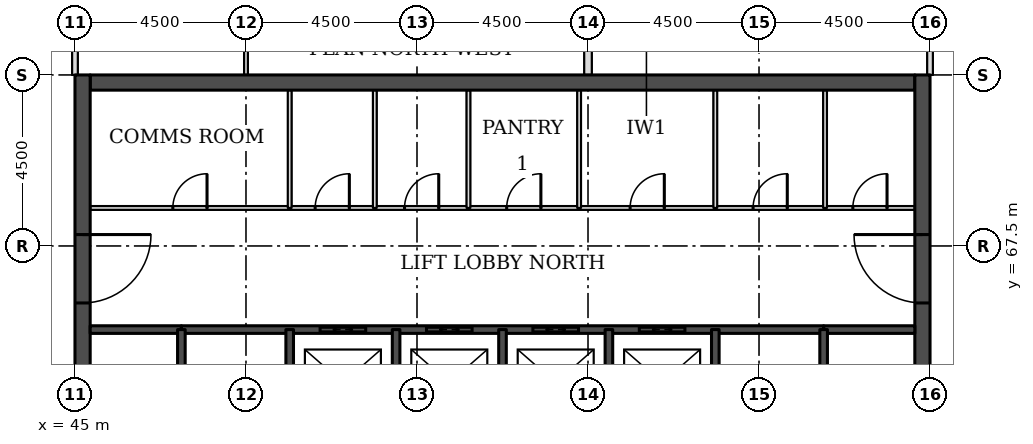
"""IFC4 building model, lengths in metres.
Left out: names, types, materials, properties, quantities, classifications, styles, units other than length and angle.
Written with IfcOpenShell. Run it as: python <this file> out.ifc"""

import sys

from ifc_helpers import new_model, si_unit, direction, frame, frame_2d, origin, place, context, subcontext, project, spatial, rectangle, extrude, element, fill, save


model = new_model("IFC4")
c1 = context("Model", 3, precision=1e-05, world=origin(), true_north=direction((0.0, 1.0)))
c2 = subcontext(c1, "Body", "Model", "MODEL_VIEW")
j1 = project(units=[si_unit("LENGTHUNIT", "METRE"), si_unit("PLANEANGLEUNIT", "RADIAN")], contexts=[c1])
p1 = place(None, origin())
s1 = spatial("IfcSite", under=j1, at=p1, CompositionType="ELEMENT")
p2 = place(p1, origin())
s2 = spatial("IfcBuilding", under=s1, at=p2, CompositionType="ELEMENT")
p3 = place(p2, frame((0.0, 0.0, 158.8)))
s3 = spatial("IfcBuildingStorey", under=s2, at=p3, CompositionType="ELEMENT", Elevation=158.8)
p4 = place(p3, frame((45.4, 71.8, 0.0), z_axis=(0.0, 0.0, 1.0), x_axis=(1.0, 0.0, 0.0)))
e1 = element("IfcWall", 1, at=p4, inside=s3, PredefinedType="SHEAR", context=c2, shape_type="SweptSolid", body=[
    extrude(rectangle(XDim=21.7, YDim=0.4, at=frame_2d((10.85, 0.0))), origin(), (0.0, 0.0, 1.0), 3.7),
])
p5 = place(p3, frame((45.2, 49.5, 0.0), z_axis=(0.0, 0.0, 1.0), x_axis=(0.0, 1.0, 0.0)))
e2 = element("IfcWall", 2, at=p5, inside=s3, PredefinedType="SHEAR", context=c2, shape_type="SweptSolid", body=[
    extrude(rectangle(XDim=22.5, YDim=0.4, at=frame_2d((11.25, 0.0))), origin(), (0.0, 0.0, 1.0), 3.7),
])
p6 = place(p5, frame((4.2, 0.0, 0.0)))
e3 = element("IfcOpeningElement", 3, at=p6, cuts=e2, PredefinedType="OPENING", context=c2, shape_type="SweptSolid", body=[
    extrude(rectangle(XDim=1.8, YDim=2.1, at=frame_2d((0.9, 1.05))), frame((0.0, 0.21, 0.0), z_axis=(0.0, -1.0, 0.0), x_axis=(1.0, 0.0, 0.0)), (0.0, 0.0, 1.0), 0.42),
])
p7 = place(p5, frame((6.9, 0.0, 0.0)))
e4 = element("IfcOpeningElement", 4, at=p7, cuts=e2, PredefinedType="OPENING", context=c2, shape_type="SweptSolid", body=[
    extrude(rectangle(XDim=1.1, YDim=2.1, at=frame_2d((0.55, 1.05))), frame((0.0, 0.21, 0.0), z_axis=(0.0, -1.0, 0.0), x_axis=(1.0, 0.0, 0.0)), (0.0, 0.0, 1.0), 0.42),
])
p8 = place(p5, frame((13.6, 0.0, 0.0)))
e5 = element("IfcOpeningElement", 5, at=p8, cuts=e2, PredefinedType="OPENING", context=c2, shape_type="SweptSolid", body=[
    extrude(rectangle(XDim=1.1, YDim=2.1, at=frame_2d((0.55, 1.05))), frame((0.0, 0.21, 0.0), z_axis=(0.0, -1.0, 0.0), x_axis=(1.0, 0.0, 0.0)), (0.0, 0.0, 1.0), 0.42),
])
p9 = place(p5, frame((16.5, 0.0, 0.0)))
e6 = element("IfcOpeningElement", 6, at=p9, cuts=e2, PredefinedType="OPENING", context=c2, shape_type="SweptSolid", body=[
    extrude(rectangle(XDim=1.8, YDim=2.1, at=frame_2d((0.9, 1.05))), frame((0.0, 0.21, 0.0), z_axis=(0.0, -1.0, 0.0), x_axis=(1.0, 0.0, 0.0)), (0.0, 0.0, 1.0), 0.42),
])
p10 = place(p3, frame((67.3, 49.5, 0.0), z_axis=(0.0, 0.0, 1.0), x_axis=(0.0, 1.0, 0.0)))
e7 = element("IfcWall", 7, at=p10, inside=s3, PredefinedType="SHEAR", context=c2, shape_type="SweptSolid", body=[
    extrude(rectangle(XDim=22.5, YDim=0.4, at=frame_2d((11.25, 0.0))), origin(), (0.0, 0.0, 1.0), 3.7),
])
p11 = place(p10, frame((4.2, 0.0, 0.0)))
e8 = element("IfcOpeningElement", 8, at=p11, cuts=e7, PredefinedType="OPENING", context=c2, shape_type="SweptSolid", body=[
    extrude(rectangle(XDim=1.8, YDim=2.1, at=frame_2d((0.9, 1.05))), frame((0.0, 0.21, 0.0), z_axis=(0.0, -1.0, 0.0), x_axis=(1.0, 0.0, 0.0)), (0.0, 0.0, 1.0), 0.42),
])
p12 = place(p10, frame((6.9, 0.0, 0.0)))
e9 = element("IfcOpeningElement", 9, at=p12, cuts=e7, PredefinedType="OPENING", context=c2, shape_type="SweptSolid", body=[
    extrude(rectangle(XDim=1.1, YDim=2.1, at=frame_2d((0.55, 1.05))), frame((0.0, 0.21, 0.0), z_axis=(0.0, -1.0, 0.0), x_axis=(1.0, 0.0, 0.0)), (0.0, 0.0, 1.0), 0.42),
])
p13 = place(p10, frame((13.6, 0.0, 0.0)))
e10 = element("IfcOpeningElement", 10, at=p13, cuts=e7, PredefinedType="OPENING", context=c2, shape_type="SweptSolid", body=[
    extrude(rectangle(XDim=1.1, YDim=2.1, at=frame_2d((0.55, 1.05))), frame((0.0, 0.21, 0.0), z_axis=(0.0, -1.0, 0.0), x_axis=(1.0, 0.0, 0.0)), (0.0, 0.0, 1.0), 0.42),
])
p14 = place(p10, frame((16.5, 0.0, 0.0)))
e11 = element("IfcOpeningElement", 11, at=p14, cuts=e7, PredefinedType="OPENING", context=c2, shape_type="SweptSolid", body=[
    extrude(rectangle(XDim=1.8, YDim=2.1, at=frame_2d((0.9, 1.05))), frame((0.0, 0.21, 0.0), z_axis=(0.0, -1.0, 0.0), x_axis=(1.0, 0.0, 0.0)), (0.0, 0.0, 1.0), 0.42),
])
p15 = place(p3, frame((45.0, 72.0, 0.0), z_axis=(0.0, 0.0, 1.0), x_axis=(0.0, 1.0, 0.0)))
e12 = element("IfcWall", 12, at=p15, inside=s3, PredefinedType="PARTITIONING", context=c2, shape_type="SweptSolid", body=[
    extrude(rectangle(XDim=3.0, YDim=0.15, at=frame_2d((1.5, 0.0))), origin(), (0.0, 0.0, 1.0), 3.022),
])
p16 = place(p3, frame((49.5, 72.0, 0.0), z_axis=(0.0, 0.0, 1.0), x_axis=(0.0, 1.0, 0.0)))
e13 = element("IfcWall", 13, at=p16, inside=s3, PredefinedType="PARTITIONING", context=c2, shape_type="SweptSolid", body=[
    extrude(rectangle(XDim=3.0, YDim=0.1, at=frame_2d((1.5, 0.0))), origin(), (0.0, 0.0, 1.0), 3.55),
])
p17 = place(p3, frame((58.5, 72.0, 0.0), z_axis=(0.0, 0.0, 1.0), x_axis=(0.0, 1.0, 0.0)))
e14 = element("IfcWall", 14, at=p17, inside=s3, PredefinedType="PARTITIONING", context=c2, shape_type="SweptSolid", body=[
    extrude(rectangle(XDim=3.0, YDim=0.2, at=frame_2d((1.5, 0.0))), origin(), (0.0, 0.0, 1.0), 3.55),
])
p18 = place(p3, frame((67.5, 72.0, 0.0), z_axis=(0.0, 0.0, 1.0), x_axis=(0.0, 1.0, 0.0)))
e15 = element("IfcWall", 15, at=p18, inside=s3, PredefinedType="PARTITIONING", context=c2, shape_type="SweptSolid", body=[
    extrude(rectangle(XDim=3.0, YDim=0.15, at=frame_2d((1.5, 0.0))), origin(), (0.0, 0.0, 1.0), 3.022),
])
for number, where, z_axis, x_axis in (
    (16, (45.4, 65.3, 0.0), (0.0, 0.0, 1.0), (1.0, 0.0, 0.0)),
    (17, (64.7, 65.3, 0.0), (0.0, 0.0, 1.0), (1.0, 0.0, 0.0)),
):
    element("IfcWall", number, at=place(p3, frame(where, z_axis=z_axis, x_axis=x_axis)), inside=s3, PredefinedType="SOLIDWALL", context=c2, shape_type="SweptSolid", body=[
        extrude(rectangle(XDim=2.4, YDim=0.2, at=frame_2d((1.2, 0.0))), origin(), (0.0, 0.0, 1.0), 3.55),
    ])
p19 = place(p3, frame((47.8, 65.3, 0.0), z_axis=(0.0, 0.0, 1.0), x_axis=(1.0, 0.0, 0.0)))
e18 = element("IfcWall", 18, at=p19, inside=s3, PredefinedType="SOLIDWALL", context=c2, shape_type="SweptSolid", body=[
    extrude(rectangle(XDim=16.9, YDim=0.2, at=frame_2d((8.45, 0.0))), origin(), (0.0, 0.0, 1.0), 3.55),
])
p20 = place(p19, frame((3.65, 0.0, 0.0)))
e19 = element("IfcOpeningElement", 19, at=p20, cuts=e18, PredefinedType="OPENING", context=c2, shape_type="SweptSolid", body=[
    extrude(rectangle(XDim=1.2, YDim=2.1, at=frame_2d((0.6, 1.05))), frame((0.0, 0.11, 0.0), z_axis=(0.0, -1.0, 0.0), x_axis=(1.0, 0.0, 0.0)), (0.0, 0.0, 1.0), 0.22),
])
p21 = place(p19, frame((6.45, 0.0, 0.0)))
e20 = element("IfcOpeningElement", 20, at=p21, cuts=e18, PredefinedType="OPENING", context=c2, shape_type="SweptSolid", body=[
    extrude(rectangle(XDim=1.2, YDim=2.1, at=frame_2d((0.6, 1.05))), frame((0.0, 0.11, 0.0), z_axis=(0.0, -1.0, 0.0), x_axis=(1.0, 0.0, 0.0)), (0.0, 0.0, 1.0), 0.22),
])
p22 = place(p19, frame((9.25, 0.0, 0.0)))
e21 = element("IfcOpeningElement", 21, at=p22, cuts=e18, PredefinedType="OPENING", context=c2, shape_type="SweptSolid", body=[
    extrude(rectangle(XDim=1.2, YDim=2.1, at=frame_2d((0.6, 1.05))), frame((0.0, 0.11, 0.0), z_axis=(0.0, -1.0, 0.0), x_axis=(1.0, 0.0, 0.0)), (0.0, 0.0, 1.0), 0.22),
])
p23 = place(p19, frame((12.05, 0.0, 0.0)))
e22 = element("IfcOpeningElement", 22, at=p23, cuts=e18, PredefinedType="OPENING", context=c2, shape_type="SweptSolid", body=[
    extrude(rectangle(XDim=1.2, YDim=2.1, at=frame_2d((0.6, 1.05))), frame((0.0, 0.11, 0.0), z_axis=(0.0, -1.0, 0.0), x_axis=(1.0, 0.0, 0.0)), (0.0, 0.0, 1.0), 0.22),
])
p24 = place(p3, frame((45.4, 68.5, 0.0), z_axis=(0.0, 0.0, 1.0), x_axis=(1.0, 0.0, 0.0)))
e23 = element("IfcWall", 23, at=p24, inside=s3, PredefinedType="PARTITIONING", context=c2, shape_type="SweptSolid", body=[
    extrude(rectangle(XDim=21.7, YDim=0.1, at=frame_2d((10.85, 0.0))), origin(), (0.0, 0.0, 1.0), 3.55),
])
p25 = place(p24, frame((20.069, 0.0, 0.0)))
e24 = element("IfcOpeningElement", 24, at=p25, cuts=e23, PredefinedType="OPENING", context=c2, shape_type="SweptSolid", body=[
    extrude(rectangle(XDim=0.9, YDim=2.1, at=frame_2d((0.45, 1.05))), frame((0.0, 0.06, 0.0), z_axis=(0.0, -1.0, 0.0), x_axis=(1.0, 0.0, 0.0)), (0.0, 0.0, 1.0), 0.12),
])
p26 = place(p24, frame((17.444, 0.0, 0.0)))
e25 = element("IfcOpeningElement", 25, at=p26, cuts=e23, PredefinedType="OPENING", context=c2, shape_type="SweptSolid", body=[
    extrude(rectangle(XDim=0.9, YDim=2.1, at=frame_2d((0.45, 1.05))), frame((0.0, 0.06, 0.0), z_axis=(0.0, -1.0, 0.0), x_axis=(1.0, 0.0, 0.0)), (0.0, 0.0, 1.0), 0.12),
])
p27 = place(p24, frame((2.175, 0.0, 0.0)))
e26 = element("IfcOpeningElement", 26, at=p27, cuts=e23, PredefinedType="OPENING", context=c2, shape_type="SweptSolid", body=[
    extrude(rectangle(XDim=0.9, YDim=2.1, at=frame_2d((0.45, 1.05))), frame((0.0, 0.06, 0.0), z_axis=(0.0, -1.0, 0.0), x_axis=(1.0, 0.0, 0.0)), (0.0, 0.0, 1.0), 0.12),
])
p28 = place(p24, frame((14.208, 0.0, 0.0)))
e27 = element("IfcOpeningElement", 27, at=p28, cuts=e23, PredefinedType="OPENING", context=c2, shape_type="SweptSolid", body=[
    extrude(rectangle(XDim=0.9, YDim=2.1, at=frame_2d((0.45, 1.05))), frame((0.0, 0.06, 0.0), z_axis=(0.0, -1.0, 0.0), x_axis=(1.0, 0.0, 0.0)), (0.0, 0.0, 1.0), 0.12),
])
p29 = place(p24, frame((10.96, 0.0, 0.0)))
e28 = element("IfcOpeningElement", 28, at=p29, cuts=e23, PredefinedType="OPENING", context=c2, shape_type="SweptSolid", body=[
    extrude(rectangle(XDim=0.9, YDim=2.1, at=frame_2d((0.45, 1.05))), frame((0.0, 0.06, 0.0), z_axis=(0.0, -1.0, 0.0), x_axis=(1.0, 0.0, 0.0)), (0.0, 0.0, 1.0), 0.12),
])
p30 = place(p24, frame((8.272, 0.0, 0.0)))
e29 = element("IfcOpeningElement", 29, at=p30, cuts=e23, PredefinedType="OPENING", context=c2, shape_type="SweptSolid", body=[
    extrude(rectangle(XDim=0.9, YDim=2.1, at=frame_2d((0.45, 1.05))), frame((0.0, 0.06, 0.0), z_axis=(0.0, -1.0, 0.0), x_axis=(1.0, 0.0, 0.0)), (0.0, 0.0, 1.0), 0.12),
])
p31 = place(p24, frame((5.92, 0.0, 0.0)))
e30 = element("IfcOpeningElement", 30, at=p31, cuts=e23, PredefinedType="OPENING", context=c2, shape_type="SweptSolid", body=[
    extrude(rectangle(XDim=0.9, YDim=2.1, at=frame_2d((0.45, 1.05))), frame((0.0, 0.06, 0.0), z_axis=(0.0, -1.0, 0.0), x_axis=(1.0, 0.0, 0.0)), (0.0, 0.0, 1.0), 0.12),
])
p32 = place(p3, frame((47.8, 62.0, 0.0), z_axis=(0.0, 0.0, 1.0), x_axis=(0.0, 1.0, 0.0)))
e31 = element("IfcWall", 31, at=p32, inside=s3, PredefinedType="SOLIDWALL", context=c2, shape_type="SweptSolid", body=[
    extrude(rectangle(XDim=3.3, YDim=0.2, at=frame_2d((1.65, 0.0))), origin(), (0.0, 0.0, 1.0), 3.55),
])
p33 = place(p32, frame((1.1, 0.0, 0.0)))
e32 = element("IfcOpeningElement", 32, at=p33, cuts=e31, PredefinedType="OPENING", context=c2, shape_type="SweptSolid", body=[
    extrude(rectangle(XDim=1.1, YDim=2.1, at=frame_2d((0.55, 1.05))), frame((0.0, 0.11, 0.0), z_axis=(0.0, -1.0, 0.0), x_axis=(1.0, 0.0, 0.0)), (0.0, 0.0, 1.0), 0.22),
])
p34 = place(p3, frame((50.65, 68.5, 0.0), z_axis=(0.0, 0.0, 1.0), x_axis=(0.0, 1.0, 0.0)))
e33 = element("IfcWall", 33, at=p34, inside=s3, PredefinedType="PARTITIONING", context=c2, shape_type="SweptSolid", body=[
    extrude(rectangle(XDim=3.1, YDim=0.1, at=frame_2d((1.55, 0.0))), origin(), (0.0, 0.0, 1.0), 3.55),
])
p35 = place(p3, frame((50.65, 62.0, 0.0), z_axis=(0.0, 0.0, 1.0), x_axis=(0.0, 1.0, 0.0)))
e34 = element("IfcWall", 34, at=p35, inside=s3, PredefinedType="SOLIDWALL", context=c2, shape_type="SweptSolid", body=[
    extrude(rectangle(XDim=3.3, YDim=0.2, at=frame_2d((1.65, 0.0))), origin(), (0.0, 0.0, 1.0), 3.55),
])
p36 = place(p3, frame((52.89, 68.5, 0.0), z_axis=(0.0, 0.0, 1.0), x_axis=(0.0, 1.0, 0.0)))
e35 = element("IfcWall", 35, at=p36, inside=s3, PredefinedType="PARTITIONING", context=c2, shape_type="SweptSolid", body=[
    extrude(rectangle(XDim=3.1, YDim=0.1, at=frame_2d((1.55, 0.0))), origin(), (0.0, 0.0, 1.0), 3.55),
])
p37 = place(p3, frame((53.45, 62.5, 0.0), z_axis=(0.0, 0.0, 1.0), x_axis=(0.0, 1.0, 0.0)))
e36 = element("IfcWall", 36, at=p37, inside=s3, PredefinedType="SOLIDWALL", context=c2, shape_type="SweptSolid", body=[
    extrude(rectangle(XDim=2.8, YDim=0.2, at=frame_2d((1.4, 0.0))), origin(), (0.0, 0.0, 1.0), 3.55),
])
p38 = place(p3, frame((55.354, 68.5, 0.0), z_axis=(0.0, 0.0, 1.0), x_axis=(0.0, 1.0, 0.0)))
e37 = element("IfcWall", 37, at=p38, inside=s3, PredefinedType="PARTITIONING", context=c2, shape_type="SweptSolid", body=[
    extrude(rectangle(XDim=3.1, YDim=0.1, at=frame_2d((1.55, 0.0))), origin(), (0.0, 0.0, 1.0), 3.55),
])
p39 = place(p3, frame((56.25, 62.5, 0.0), z_axis=(0.0, 0.0, 1.0), x_axis=(0.0, 1.0, 0.0)))
e38 = element("IfcWall", 38, at=p39, inside=s3, PredefinedType="SOLIDWALL", context=c2, shape_type="SweptSolid", body=[
    extrude(rectangle(XDim=2.8, YDim=0.2, at=frame_2d((1.4, 0.0))), origin(), (0.0, 0.0, 1.0), 3.55),
])
p40 = place(p3, frame((58.266, 68.5, 0.0), z_axis=(0.0, 0.0, 1.0), x_axis=(0.0, 1.0, 0.0)))
e39 = element("IfcWall", 39, at=p40, inside=s3, PredefinedType="PARTITIONING", context=c2, shape_type="SweptSolid", body=[
    extrude(rectangle(XDim=3.1, YDim=0.1, at=frame_2d((1.55, 0.0))), origin(), (0.0, 0.0, 1.0), 3.55),
])
p41 = place(p3, frame((59.05, 62.5, 0.0), z_axis=(0.0, 0.0, 1.0), x_axis=(0.0, 1.0, 0.0)))
e40 = element("IfcWall", 40, at=p41, inside=s3, PredefinedType="SOLIDWALL", context=c2, shape_type="SweptSolid", body=[
    extrude(rectangle(XDim=2.8, YDim=0.2, at=frame_2d((1.4, 0.0))), origin(), (0.0, 0.0, 1.0), 3.55),
])
p42 = place(p3, frame((61.85, 68.5, 0.0), z_axis=(0.0, 0.0, 1.0), x_axis=(0.0, 1.0, 0.0)))
e41 = element("IfcWall", 41, at=p42, inside=s3, PredefinedType="PARTITIONING", context=c2, shape_type="SweptSolid", body=[
    extrude(rectangle(XDim=3.1, YDim=0.1, at=frame_2d((1.55, 0.0))), origin(), (0.0, 0.0, 1.0), 3.55),
])
p43 = place(p3, frame((61.85, 62.0, 0.0), z_axis=(0.0, 0.0, 1.0), x_axis=(0.0, 1.0, 0.0)))
e42 = element("IfcWall", 42, at=p43, inside=s3, PredefinedType="SOLIDWALL", context=c2, shape_type="SweptSolid", body=[
    extrude(rectangle(XDim=3.3, YDim=0.2, at=frame_2d((1.65, 0.0))), origin(), (0.0, 0.0, 1.0), 3.55),
])
p44 = place(p3, frame((64.7, 62.0, 0.0), z_axis=(0.0, 0.0, 1.0), x_axis=(0.0, 1.0, 0.0)))
e43 = element("IfcWall", 43, at=p44, inside=s3, PredefinedType="SOLIDWALL", context=c2, shape_type="SweptSolid", body=[
    extrude(rectangle(XDim=3.3, YDim=0.2, at=frame_2d((1.65, 0.0))), origin(), (0.0, 0.0, 1.0), 3.55),
])
p45 = place(p44, frame((1.1, 0.0, 0.0)))
e44 = element("IfcOpeningElement", 44, at=p45, cuts=e43, PredefinedType="OPENING", context=c2, shape_type="SweptSolid", body=[
    extrude(rectangle(XDim=1.1, YDim=2.1, at=frame_2d((0.55, 1.05))), frame((0.0, 0.11, 0.0), z_axis=(0.0, -1.0, 0.0), x_axis=(1.0, 0.0, 0.0)), (0.0, 0.0, 1.0), 0.22),
])
p46 = place(p3, frame((64.738, 68.5, 0.0), z_axis=(0.0, 0.0, 1.0), x_axis=(0.0, 1.0, 0.0)))
e45 = element("IfcWall", 45, at=p46, inside=s3, PredefinedType="PARTITIONING", context=c2, shape_type="SweptSolid", body=[
    extrude(rectangle(XDim=3.1, YDim=0.1, at=frame_2d((1.55, 0.0))), origin(), (0.0, 0.0, 1.0), 3.55),
])
p47 = place(p20, origin())
e46 = element("IfcDoor", 46, at=p47, inside=s3, OperationType="DOUBLE_DOOR_SLIDING", PredefinedType="DOOR", context=c2, shape_type="SweptSolid", body=[
    extrude(rectangle(XDim=1.2, YDim=2.1, at=frame_2d((0.6, 1.05))), frame((0.0, 0.025, 0.0), z_axis=(0.0, -1.0, 0.0), x_axis=(1.0, 0.0, 0.0)), (0.0, 0.0, 1.0), 0.05),
])
fill(e19, e46)
p48 = place(p21, origin())
e47 = element("IfcDoor", 47, at=p48, inside=s3, OperationType="DOUBLE_DOOR_SLIDING", PredefinedType="DOOR", context=c2, shape_type="SweptSolid", body=[
    extrude(rectangle(XDim=1.2, YDim=2.1, at=frame_2d((0.6, 1.05))), frame((0.0, 0.025, 0.0), z_axis=(0.0, -1.0, 0.0), x_axis=(1.0, 0.0, 0.0)), (0.0, 0.0, 1.0), 0.05),
])
fill(e20, e47)
p49 = place(p22, origin())
e48 = element("IfcDoor", 48, at=p49, inside=s3, OperationType="DOUBLE_DOOR_SLIDING", PredefinedType="DOOR", context=c2, shape_type="SweptSolid", body=[
    extrude(rectangle(XDim=1.2, YDim=2.1, at=frame_2d((0.6, 1.05))), frame((0.0, 0.025, 0.0), z_axis=(0.0, -1.0, 0.0), x_axis=(1.0, 0.0, 0.0)), (0.0, 0.0, 1.0), 0.05),
])
fill(e21, e48)
p50 = place(p23, origin())
e49 = element("IfcDoor", 49, at=p50, inside=s3, OperationType="DOUBLE_DOOR_SLIDING", PredefinedType="DOOR", context=c2, shape_type="SweptSolid", body=[
    extrude(rectangle(XDim=1.2, YDim=2.1, at=frame_2d((0.6, 1.05))), frame((0.0, 0.025, 0.0), z_axis=(0.0, -1.0, 0.0), x_axis=(1.0, 0.0, 0.0)), (0.0, 0.0, 1.0), 0.05),
])
fill(e22, e49)
p51 = place(p9, frame((1.8, 0.0, 0.0), z_axis=(0.0, 0.0, 1.0), x_axis=(-1.0, 0.0, 0.0)))
e50 = element("IfcDoor", 50, at=p51, inside=s3, OperationType="SINGLE_SWING_LEFT", PredefinedType="DOOR", context=c2, shape_type="SweptSolid", body=[
    extrude(rectangle(XDim=1.8, YDim=2.1, at=frame_2d((0.9, 1.05))), frame((0.0, 0.025, 0.0), z_axis=(0.0, -1.0, 0.0), x_axis=(1.0, 0.0, 0.0)), (0.0, 0.0, 1.0), 0.05),
])
fill(e6, e50)
p52 = place(p14, origin())
e51 = element("IfcDoor", 51, at=p52, inside=s3, OperationType="SINGLE_SWING_RIGHT", PredefinedType="DOOR", context=c2, shape_type="SweptSolid", body=[
    extrude(rectangle(XDim=1.8, YDim=2.1, at=frame_2d((0.9, 1.05))), frame((0.0, 0.025, 0.0), z_axis=(0.0, -1.0, 0.0), x_axis=(1.0, 0.0, 0.0)), (0.0, 0.0, 1.0), 0.05),
])
fill(e11, e51)
p53 = place(p25, origin())
e52 = element("IfcDoor", 52, at=p53, inside=s3, OperationType="SINGLE_SWING_RIGHT", PredefinedType="DOOR", context=c2, shape_type="SweptSolid", body=[
    extrude(rectangle(XDim=0.9, YDim=2.1, at=frame_2d((0.45, 1.05))), frame((0.0, 0.025, 0.0), z_axis=(0.0, -1.0, 0.0), x_axis=(1.0, 0.0, 0.0)), (0.0, 0.0, 1.0), 0.05),
])
fill(e24, e52)
p54 = place(p26, origin())
e53 = element("IfcDoor", 53, at=p54, inside=s3, OperationType="SINGLE_SWING_RIGHT", PredefinedType="DOOR", context=c2, shape_type="SweptSolid", body=[
    extrude(rectangle(XDim=0.9, YDim=2.1, at=frame_2d((0.45, 1.05))), frame((0.0, 0.025, 0.0), z_axis=(0.0, -1.0, 0.0), x_axis=(1.0, 0.0, 0.0)), (0.0, 0.0, 1.0), 0.05),
])
fill(e25, e53)
p55 = place(p27, origin())
e54 = element("IfcDoor", 54, at=p55, inside=s3, OperationType="SINGLE_SWING_RIGHT", PredefinedType="DOOR", context=c2, shape_type="SweptSolid", body=[
    extrude(rectangle(XDim=0.9, YDim=2.1, at=frame_2d((0.45, 1.05))), frame((0.0, 0.025, 0.0), z_axis=(0.0, -1.0, 0.0), x_axis=(1.0, 0.0, 0.0)), (0.0, 0.0, 1.0), 0.05),
])
fill(e26, e54)
p56 = place(p28, origin())
e55 = element("IfcDoor", 55, at=p56, inside=s3, OperationType="SINGLE_SWING_RIGHT", PredefinedType="DOOR", context=c2, shape_type="SweptSolid", body=[
    extrude(rectangle(XDim=0.9, YDim=2.1, at=frame_2d((0.45, 1.05))), frame((0.0, 0.025, 0.0), z_axis=(0.0, -1.0, 0.0), x_axis=(1.0, 0.0, 0.0)), (0.0, 0.0, 1.0), 0.05),
])
fill(e27, e55)
p57 = place(p29, origin())
e56 = element("IfcDoor", 56, at=p57, inside=s3, OperationType="SINGLE_SWING_RIGHT", PredefinedType="DOOR", context=c2, shape_type="SweptSolid", body=[
    extrude(rectangle(XDim=0.9, YDim=2.1, at=frame_2d((0.45, 1.05))), frame((0.0, 0.025, 0.0), z_axis=(0.0, -1.0, 0.0), x_axis=(1.0, 0.0, 0.0)), (0.0, 0.0, 1.0), 0.05),
])
fill(e28, e56)
p58 = place(p30, origin())
e57 = element("IfcDoor", 57, at=p58, inside=s3, OperationType="SINGLE_SWING_RIGHT", PredefinedType="DOOR", context=c2, shape_type="SweptSolid", body=[
    extrude(rectangle(XDim=0.9, YDim=2.1, at=frame_2d((0.45, 1.05))), frame((0.0, 0.025, 0.0), z_axis=(0.0, -1.0, 0.0), x_axis=(1.0, 0.0, 0.0)), (0.0, 0.0, 1.0), 0.05),
])
fill(e29, e57)
p59 = place(p31, origin())
e58 = element("IfcDoor", 58, at=p59, inside=s3, OperationType="SINGLE_SWING_RIGHT", PredefinedType="DOOR", context=c2, shape_type="SweptSolid", body=[
    extrude(rectangle(XDim=0.9, YDim=2.1, at=frame_2d((0.45, 1.05))), frame((0.0, 0.025, 0.0), z_axis=(0.0, -1.0, 0.0), x_axis=(1.0, 0.0, 0.0)), (0.0, 0.0, 1.0), 0.05),
])
fill(e30, e58)
save(model, sys.argv[1])
